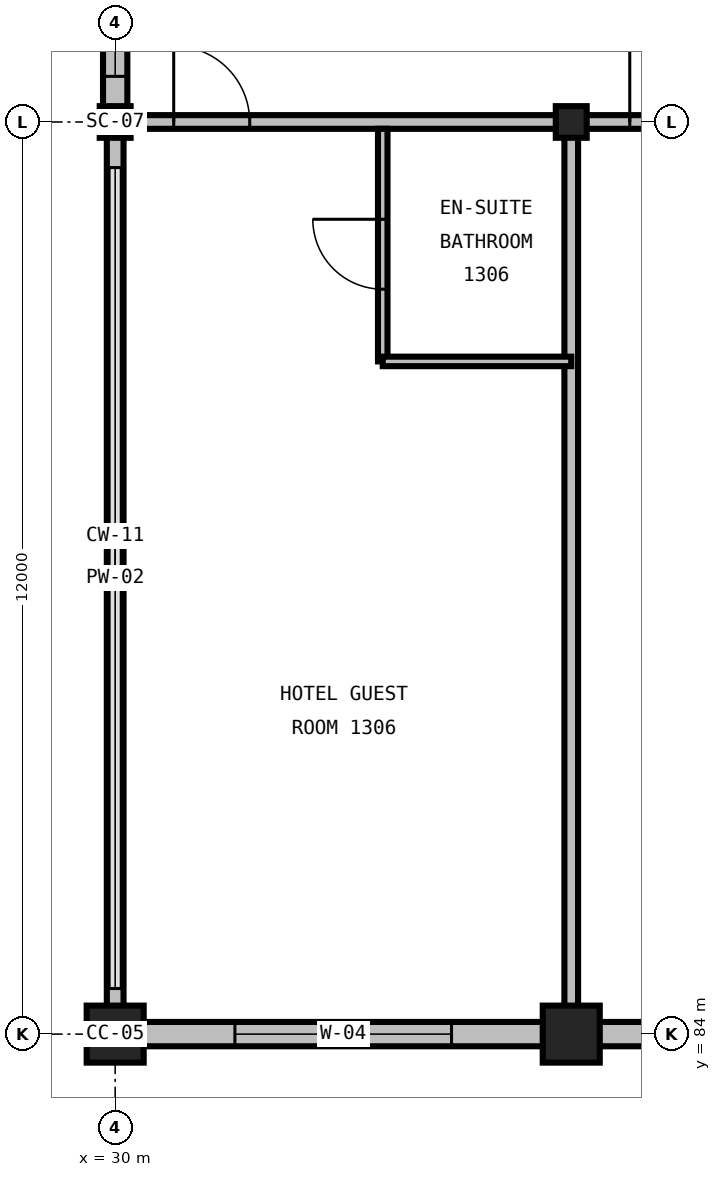
"""IFC4 building model, lengths in metres.
Left out: names, types, materials, properties, quantities, classifications, styles, units other than length and angle.
Written with IfcOpenShell. Run it as: python <this file> out.ifc"""

import sys

from ifc_helpers import new_model, si_unit, direction, frame, frame_2d, origin, origin_2d, place, context, subcontext, project, spatial, rectangle, i_section, extrude, element, fill, save


model = new_model("IFC4")
c1 = context("Model", 3, precision=1e-05, world=origin(), true_north=direction((0.0, 1.0)))
c2 = subcontext(c1, "Body", "Model", "MODEL_VIEW")
j1 = project(units=[si_unit("LENGTHUNIT", "METRE"), si_unit("PLANEANGLEUNIT", "RADIAN")], contexts=[c1])
p1 = place(None, origin())
s1 = spatial("IfcSite", under=j1, at=p1, CompositionType="ELEMENT")
p2 = place(p1, origin())
s2 = spatial("IfcBuilding", under=s1, at=p2, CompositionType="ELEMENT")
p3 = place(p2, frame((0.0, 0.0, 56.4)))
s3 = spatial("IfcBuildingStorey", under=s2, at=p3, CompositionType="ELEMENT", Elevation=56.4)
p4 = place(p3, frame((30.0, 84.0, 0.0), z_axis=(0.0, 0.0, 1.0), x_axis=(1.0, 0.0, 0.0)))
e1 = element("IfcColumn", 1, at=p4, inside=s3, PredefinedType="COLUMN", context=c2, shape_type="SweptSolid", body=[
    extrude(rectangle(XDim=0.75, YDim=0.75, at=origin_2d()), origin(), (0.0, 0.0, 1.0), 3.6),
])
p5 = place(p3, frame((30.0, 96.0, 0.0), z_axis=(0.0, 0.0, 1.0), x_axis=(1.0, 0.0, 0.0)))
e2 = element("IfcColumn", 2, at=p5, inside=s3, PredefinedType="COLUMN", context=c2, shape_type="SweptSolid", body=[
    extrude(i_section(OverallWidth=0.406, OverallDepth=0.416, WebThickness=0.03, FlangeThickness=0.048, FilletRadius=0.031, at=origin_2d()), origin(), (0.0, 0.0, 1.0), 3.6),
])
p6 = place(p3, frame((36.0, 84.0, 0.0), z_axis=(0.0, 0.0, 1.0), x_axis=(1.0, 0.0, 0.0)))
e3 = element("IfcColumn", 3, at=p6, inside=s3, PredefinedType="COLUMN", context=c2, shape_type="SweptSolid", body=[
    extrude(rectangle(XDim=0.75, YDim=0.75, at=origin_2d()), origin(), (0.0, 0.0, 1.0), 3.6),
])
p7 = place(p3, frame((36.0, 96.0, 0.0), z_axis=(0.0, 0.0, 1.0), x_axis=(1.0, 0.0, 0.0)))
e4 = element("IfcColumn", 4, at=p7, inside=s3, PredefinedType="COLUMN", context=c2, shape_type="SweptSolid", body=[
    extrude(i_section(OverallWidth=0.406, OverallDepth=0.416, WebThickness=0.03, FlangeThickness=0.048, FilletRadius=0.031, at=origin_2d()), origin(), (0.0, 0.0, 1.0), 3.6),
])
p8 = place(p3, frame((30.0, 84.0, 0.0), z_axis=(0.0, 0.0, 1.0), x_axis=(1.0, 0.0, 0.0)))
e5 = element("IfcWall", 5, at=p8, inside=s3, PredefinedType="STANDARD", context=c2, shape_type="SweptSolid", body=[
    extrude(rectangle(XDim=6.0, YDim=0.32, at=frame_2d((3.0, 0.0))), origin(), (0.0, 0.0, 1.0), 2.536),
])
p9 = place(p8, frame((1.575, 0.0, 0.7)))
e6 = element("IfcOpeningElement", 6, at=p9, cuts=e5, PredefinedType="OPENING", context=c2, shape_type="SweptSolid", body=[
    extrude(rectangle(XDim=2.85, YDim=1.65, at=frame_2d((1.425, 0.825))), frame((0.0, 0.175, 0.0), z_axis=(0.0, -1.0, 0.0), x_axis=(1.0, 0.0, 0.0)), (0.0, 0.0, 1.0), 0.35),
])
p10 = place(p3, frame((36.0, 84.0, 0.0), z_axis=(0.0, 0.0, 1.0), x_axis=(1.0, 0.0, 0.0)))
e7 = element("IfcWall", 7, at=p10, inside=s3, PredefinedType="STANDARD", context=c2, shape_type="SweptSolid", body=[
    extrude(rectangle(XDim=6.0, YDim=0.32, at=frame_2d((3.0, 0.0))), origin(), (0.0, 0.0, 1.0), 2.536),
])
p11 = place(p10, frame((1.575, 0.0, 0.7)))
e8 = element("IfcOpeningElement", 8, at=p11, cuts=e7, PredefinedType="OPENING", context=c2, shape_type="SweptSolid", body=[
    extrude(rectangle(XDim=2.85, YDim=1.65, at=frame_2d((1.425, 0.825))), frame((0.0, 0.175, 0.0), z_axis=(0.0, -1.0, 0.0), x_axis=(1.0, 0.0, 0.0)), (0.0, 0.0, 1.0), 0.35),
])
p12 = place(p3, frame((30.0, 96.0, 0.0), z_axis=(0.0, 0.0, 1.0), x_axis=(0.0, -1.0, 0.0)))
e9 = element("IfcWall", 9, at=p12, inside=s3, PredefinedType="PARAPET", context=c2, shape_type="SweptSolid", body=[
    extrude(rectangle(XDim=12.0, YDim=0.22, at=frame_2d((6.0, 0.0))), origin(), (0.0, 0.0, 1.0), 0.2),
])
p13 = place(p3, frame((30.0, 105.0, 0.0), z_axis=(0.0, 0.0, 1.0), x_axis=(0.0, -1.0, 0.0)))
e10 = element("IfcWall", 10, at=p13, inside=s3, PredefinedType="STANDARD", context=c2, shape_type="SweptSolid", body=[
    extrude(rectangle(XDim=9.0, YDim=0.32, at=frame_2d((4.5, 0.0))), origin(), (0.0, 0.0, 1.0), 2.981),
])
p14 = place(p13, frame((6.6, 0.0, 0.85)))
e11 = element("IfcOpeningElement", 11, at=p14, cuts=e10, PredefinedType="OPENING", context=c2, shape_type="SweptSolid", body=[
    extrude(rectangle(XDim=1.8, YDim=1.5, at=frame_2d((0.9, 0.75))), frame((0.0, 0.175, 0.0), z_axis=(0.0, -1.0, 0.0), x_axis=(1.0, 0.0, 0.0)), (0.0, 0.0, 1.0), 0.35),
])
p15 = place(p3, frame((30.085, 96.0, 0.0), z_axis=(0.0, 0.0, 1.0), x_axis=(1.0, 0.0, 0.0)))
e12 = element("IfcWall", 12, at=p15, inside=s3, PredefinedType="PARTITIONING", context=c2, shape_type="SweptSolid", body=[
    extrude(rectangle(XDim=5.915, YDim=0.18, at=frame_2d((2.957, 0.0))), origin(), (0.0, 0.0, 1.0), 2.736),
])
p16 = place(p15, frame((0.685, 0.0, 0.0)))
e13 = element("IfcOpeningElement", 13, at=p16, cuts=e12, PredefinedType="OPENING", context=c2, shape_type="SweptSolid", body=[
    extrude(rectangle(XDim=1.0, YDim=2.15, at=frame_2d((0.5, 1.075))), frame((0.0, 0.105, 0.0), z_axis=(0.0, -1.0, 0.0), x_axis=(1.0, 0.0, 0.0)), (0.0, 0.0, 1.0), 0.21),
])
p17 = place(p3, frame((36.0, 84.16, 0.0), z_axis=(0.0, 0.0, 1.0), x_axis=(0.0, 1.0, 0.0)))
e14 = element("IfcWall", 14, at=p17, inside=s3, PredefinedType="PARTITIONING", context=c2, shape_type="SweptSolid", body=[
    extrude(rectangle(XDim=11.84, YDim=0.18, at=frame_2d((5.92, 0.0))), origin(), (0.0, 0.0, 1.0), 2.59),
])
p18 = place(p3, frame((33.52, 92.85, 0.0), z_axis=(0.0, 0.0, 1.0), x_axis=(0.0, 1.0, 0.0)))
e15 = element("IfcWall", 15, at=p18, inside=s3, PredefinedType="PARTITIONING", context=c2, shape_type="SweptSolid", body=[
    extrude(rectangle(XDim=3.06, YDim=0.125, at=frame_2d((1.53, 0.0))), origin(), (0.0, 0.0, 1.0), 3.29),
])
p19 = place(p18, frame((0.95, 0.0, 0.0)))
e16 = element("IfcOpeningElement", 16, at=p19, cuts=e15, PredefinedType="OPENING", context=c2, shape_type="SweptSolid", body=[
    extrude(rectangle(XDim=0.92, YDim=2.1, at=frame_2d((0.46, 1.05))), frame((0.0, 0.077, 0.0), z_axis=(0.0, -1.0, 0.0), x_axis=(1.0, 0.0, 0.0)), (0.0, 0.0, 1.0), 0.155),
])
p20 = place(p3, frame((33.52, 92.85, 0.0), z_axis=(0.0, 0.0, 1.0), x_axis=(1.0, 0.0, 0.0)))
e17 = element("IfcWall", 17, at=p20, inside=s3, PredefinedType="PARTITIONING", context=c2, shape_type="SweptSolid", body=[
    extrude(rectangle(XDim=2.48, YDim=0.125, at=frame_2d((1.24, 0.0))), origin(), (0.0, 0.0, 1.0), 3.29),
])
p21 = place(p3, frame((36.0, 96.0, 0.0), z_axis=(0.0, 0.0, 1.0), x_axis=(1.0, 0.0, 0.0)))
e18 = element("IfcWall", 18, at=p21, inside=s3, PredefinedType="PARTITIONING", context=c2, shape_type="SweptSolid", body=[
    extrude(rectangle(XDim=6.0, YDim=0.18, at=frame_2d((3.0, 0.0))), origin(), (0.0, 0.0, 1.0), 2.736),
])
p22 = place(p21, frame((0.77, 0.0, 0.0)))
e19 = element("IfcOpeningElement", 19, at=p22, cuts=e18, PredefinedType="OPENING", context=c2, shape_type="SweptSolid", body=[
    extrude(rectangle(XDim=1.0, YDim=2.15, at=frame_2d((0.5, 1.075))), frame((0.0, 0.105, 0.0), z_axis=(0.0, -1.0, 0.0), x_axis=(1.0, 0.0, 0.0)), (0.0, 0.0, 1.0), 0.21),
])
p23 = place(p9, origin())
e20 = element("IfcWindow", 20, at=p23, inside=s3, PartitioningType="TRIPLE_PANEL_VERTICAL", PredefinedType="WINDOW", context=c2, shape_type="SweptSolid", body=[
    extrude(rectangle(XDim=2.85, YDim=1.65, at=frame_2d((1.425, 0.825))), frame((0.0, 0.03, 0.0), z_axis=(0.0, -1.0, 0.0), x_axis=(1.0, 0.0, 0.0)), (0.0, 0.0, 1.0), 0.06),
])
fill(e6, e20)
p24 = place(p14, origin())
e21 = element("IfcWindow", 21, at=p24, inside=s3, PartitioningType="SINGLE_PANEL", PredefinedType="WINDOW", context=c2, shape_type="SweptSolid", body=[
    extrude(rectangle(XDim=1.8, YDim=1.5, at=frame_2d((0.9, 0.75))), frame((0.0, 0.03, 0.0), z_axis=(0.0, -1.0, 0.0), x_axis=(1.0, 0.0, 0.0)), (0.0, 0.0, 1.0), 0.06),
])
fill(e11, e21)
p25 = place(p16, origin())
e22 = element("IfcDoor", 22, at=p25, inside=s3, OperationType="SINGLE_SWING_LEFT", PredefinedType="DOOR", context=c2, shape_type="SweptSolid", body=[
    extrude(rectangle(XDim=1.0, YDim=2.15, at=frame_2d((0.5, 1.075))), frame((0.0, 0.025, 0.0), z_axis=(0.0, -1.0, 0.0), x_axis=(1.0, 0.0, 0.0)), (0.0, 0.0, 1.0), 0.05),
])
fill(e13, e22)
p26 = place(p19, origin())
e23 = element("IfcDoor", 23, at=p26, inside=s3, OperationType="SINGLE_SWING_RIGHT", PredefinedType="DOOR", context=c2, shape_type="SweptSolid", body=[
    extrude(rectangle(XDim=0.92, YDim=2.1, at=frame_2d((0.46, 1.05))), frame((0.0, 0.025, 0.0), z_axis=(0.0, -1.0, 0.0), x_axis=(1.0, 0.0, 0.0)), (0.0, 0.0, 1.0), 0.05),
])
fill(e16, e23)
p27 = place(p22, origin())
e24 = element("IfcDoor", 24, at=p27, inside=s3, OperationType="SINGLE_SWING_LEFT", PredefinedType="DOOR", context=c2, shape_type="SweptSolid", body=[
    extrude(rectangle(XDim=1.0, YDim=2.15, at=frame_2d((0.5, 1.075))), frame((0.0, 0.025, 0.0), z_axis=(0.0, -1.0, 0.0), x_axis=(1.0, 0.0, 0.0)), (0.0, 0.0, 1.0), 0.05),
])
fill(e19, e24)
save(model, sys.argv[1])
